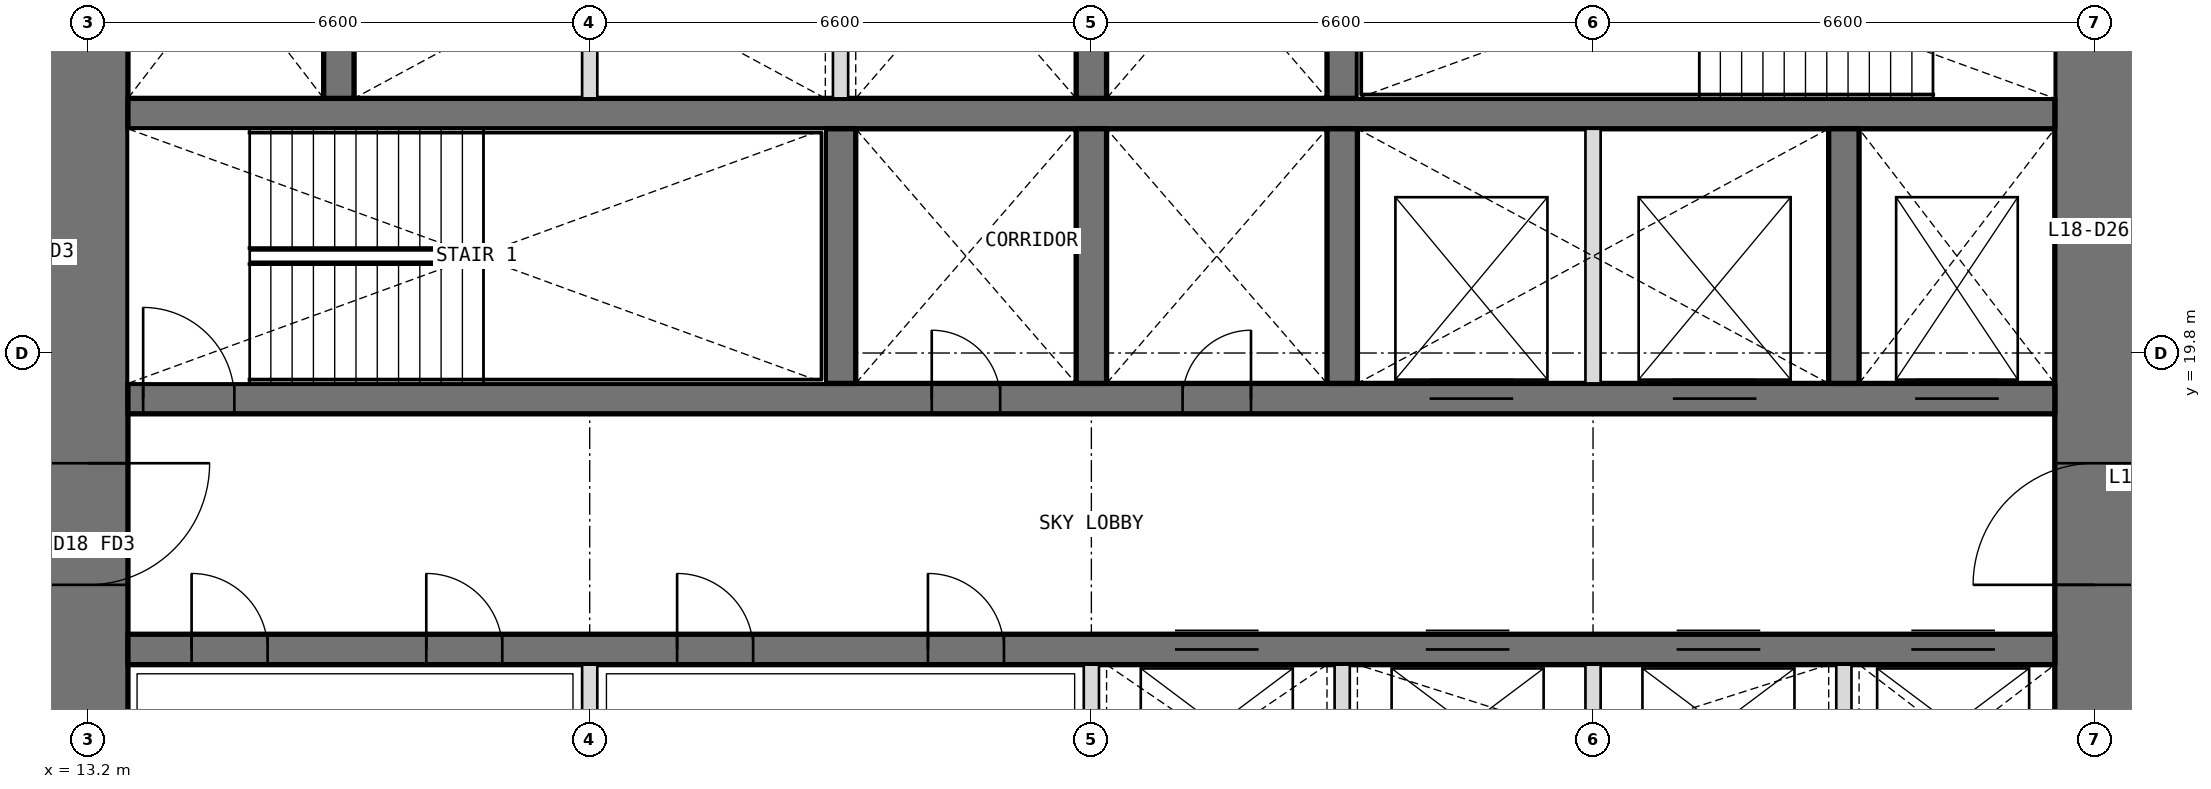
"""IFC4 building model, lengths in metres.
Left out: names, types, materials, properties, quantities, classifications, styles, units other than length and angle.
Written with IfcOpenShell. Run it as: python <this file> out.ifc"""

import sys

from ifc_helpers import new_model, si_unit, direction, frame, frame_2d, origin, place, context, subcontext, project, spatial, rectangle, extrude, element, fill, save


model = new_model("IFC4")
c1 = context("Model", 3, precision=1e-05, world=origin(), true_north=direction((0.0, 1.0)))
c2 = subcontext(c1, "Body", "Model", "MODEL_VIEW")
j1 = project(units=[si_unit("LENGTHUNIT", "METRE"), si_unit("PLANEANGLEUNIT", "RADIAN")], contexts=[c1])
p1 = place(None, origin())
s1 = spatial("IfcSite", under=j1, at=p1, CompositionType="ELEMENT")
p2 = place(p1, origin())
s2 = spatial("IfcBuilding", under=s1, at=p2, CompositionType="ELEMENT")
p3 = place(p2, frame((0.0, 0.0, 82.2)))
s3 = spatial("IfcBuildingStorey", under=s2, at=p3, CompositionType="ELEMENT", Elevation=82.2)
p4 = place(p3, frame((39.6, 13.725, 0.0), z_axis=(0.0, 0.0, 1.0), x_axis=(0.0, 1.0, 0.0)))
e1 = element("IfcWall", 1, at=p4, inside=s3, PredefinedType="SHEAR", context=c2, shape_type="SweptSolid", body=[
    extrude(rectangle(XDim=18.75, YDim=1.05, at=frame_2d((9.375, 0.0))), origin(), (0.0, 0.0, 1.0), 4.2),
])
p5 = place(p4, frame((3.025, 0.0, 0.0)))
e2 = element("IfcOpeningElement", 2, at=p5, cuts=e1, PredefinedType="OPENING", context=c2, shape_type="SweptSolid", body=[
    extrude(rectangle(XDim=1.6, YDim=2.1, at=frame_2d((0.8, 1.05))), frame((0.0, 0.535, 0.0), z_axis=(0.0, -1.0, 0.0), x_axis=(1.0, 0.0, 0.0)), (0.0, 0.0, 1.0), 1.07),
])
p6 = place(p4, frame((13.825, 0.0, 0.0)))
e3 = element("IfcOpeningElement", 3, at=p6, cuts=e1, PredefinedType="OPENING", context=c2, shape_type="SweptSolid", body=[
    extrude(rectangle(XDim=1.6, YDim=2.1, at=frame_2d((0.8, 1.05))), frame((0.0, 0.535, 0.0), z_axis=(0.0, -1.0, 0.0), x_axis=(1.0, 0.0, 0.0)), (0.0, 0.0, 1.0), 1.07),
])
p7 = place(p3, frame((13.2, 32.475, 0.0), z_axis=(0.0, 0.0, 1.0), x_axis=(0.0, -1.0, 0.0)))
e4 = element("IfcWall", 4, at=p7, inside=s3, PredefinedType="SHEAR", context=c2, shape_type="SweptSolid", body=[
    extrude(rectangle(XDim=18.75, YDim=1.05, at=frame_2d((9.375, 0.0))), origin(), (0.0, 0.0, 1.0), 4.2),
])
p8 = place(p7, frame((14.125, 0.0, 0.0)))
e5 = element("IfcOpeningElement", 5, at=p8, cuts=e4, PredefinedType="OPENING", context=c2, shape_type="SweptSolid", body=[
    extrude(rectangle(XDim=1.6, YDim=2.1, at=frame_2d((0.8, 1.05))), frame((0.0, 0.535, 0.0), z_axis=(0.0, -1.0, 0.0), x_axis=(1.0, 0.0, 0.0)), (0.0, 0.0, 1.0), 1.07),
])
p9 = place(p7, frame((3.325, 0.0, 0.0)))
e6 = element("IfcOpeningElement", 6, at=p9, cuts=e4, PredefinedType="OPENING", context=c2, shape_type="SweptSolid", body=[
    extrude(rectangle(XDim=1.6, YDim=2.1, at=frame_2d((0.8, 1.05))), frame((0.0, 0.535, 0.0), z_axis=(0.0, -1.0, 0.0), x_axis=(1.0, 0.0, 0.0)), (0.0, 0.0, 1.0), 1.07),
])
p10 = place(p3, frame((13.725, 15.9, 0.0), z_axis=(0.0, 0.0, 1.0), x_axis=(1.0, 0.0, 0.0)))
e7 = element("IfcWall", 7, at=p10, inside=s3, PredefinedType="SHEAR", context=c2, shape_type="SweptSolid", body=[
    extrude(rectangle(XDim=25.35, YDim=0.4, at=frame_2d((12.675, 0.0))), origin(), (0.0, 0.0, 1.0), 4.2),
])
p11 = place(p10, frame((0.837, 0.0, 0.0)))
e8 = element("IfcOpeningElement", 8, at=p11, cuts=e7, PredefinedType="OPENING", context=c2, shape_type="SweptSolid", body=[
    extrude(rectangle(XDim=1.0, YDim=2.1, at=frame_2d((0.5, 1.05))), frame((0.0, 0.21, 0.0), z_axis=(0.0, -1.0, 0.0), x_axis=(1.0, 0.0, 0.0)), (0.0, 0.0, 1.0), 0.42),
])
p12 = place(p10, frame((3.925, 0.0, 0.0)))
e9 = element("IfcOpeningElement", 9, at=p12, cuts=e7, PredefinedType="OPENING", context=c2, shape_type="SweptSolid", body=[
    extrude(rectangle(XDim=1.0, YDim=2.1, at=frame_2d((0.5, 1.05))), frame((0.0, 0.21, 0.0), z_axis=(0.0, -1.0, 0.0), x_axis=(1.0, 0.0, 0.0)), (0.0, 0.0, 1.0), 0.42),
])
p13 = place(p10, frame((7.225, 0.0, 0.0)))
e10 = element("IfcOpeningElement", 10, at=p13, cuts=e7, PredefinedType="OPENING", context=c2, shape_type="SweptSolid", body=[
    extrude(rectangle(XDim=1.0, YDim=2.1, at=frame_2d((0.5, 1.05))), frame((0.0, 0.21, 0.0), z_axis=(0.0, -1.0, 0.0), x_axis=(1.0, 0.0, 0.0)), (0.0, 0.0, 1.0), 0.42),
])
p14 = place(p10, frame((10.525, 0.0, 0.0)))
e11 = element("IfcOpeningElement", 11, at=p14, cuts=e7, PredefinedType="OPENING", context=c2, shape_type="SweptSolid", body=[
    extrude(rectangle(XDim=1.0, YDim=2.1, at=frame_2d((0.5, 1.05))), frame((0.0, 0.21, 0.0), z_axis=(0.0, -1.0, 0.0), x_axis=(1.0, 0.0, 0.0)), (0.0, 0.0, 1.0), 0.42),
])
p15 = place(p10, frame((13.775, 0.0, 0.0)))
e12 = element("IfcOpeningElement", 12, at=p15, cuts=e7, PredefinedType="OPENING", context=c2, shape_type="SweptSolid", body=[
    extrude(rectangle(XDim=1.1, YDim=2.1, at=frame_2d((0.55, 1.05))), frame((0.0, 0.21, 0.0), z_axis=(0.0, -1.0, 0.0), x_axis=(1.0, 0.0, 0.0)), (0.0, 0.0, 1.0), 0.42),
])
p16 = place(p10, frame((17.075, 0.0, 0.0)))
e13 = element("IfcOpeningElement", 13, at=p16, cuts=e7, PredefinedType="OPENING", context=c2, shape_type="SweptSolid", body=[
    extrude(rectangle(XDim=1.1, YDim=2.1, at=frame_2d((0.55, 1.05))), frame((0.0, 0.21, 0.0), z_axis=(0.0, -1.0, 0.0), x_axis=(1.0, 0.0, 0.0)), (0.0, 0.0, 1.0), 0.42),
])
p17 = place(p10, frame((20.375, 0.0, 0.0)))
e14 = element("IfcOpeningElement", 14, at=p17, cuts=e7, PredefinedType="OPENING", context=c2, shape_type="SweptSolid", body=[
    extrude(rectangle(XDim=1.1, YDim=2.1, at=frame_2d((0.55, 1.05))), frame((0.0, 0.21, 0.0), z_axis=(0.0, -1.0, 0.0), x_axis=(1.0, 0.0, 0.0)), (0.0, 0.0, 1.0), 0.42),
])
p18 = place(p10, frame((23.462, 0.0, 0.0)))
e15 = element("IfcOpeningElement", 15, at=p18, cuts=e7, PredefinedType="OPENING", context=c2, shape_type="SweptSolid", body=[
    extrude(rectangle(XDim=1.1, YDim=2.1, at=frame_2d((0.55, 1.05))), frame((0.0, 0.21, 0.0), z_axis=(0.0, -1.0, 0.0), x_axis=(1.0, 0.0, 0.0)), (0.0, 0.0, 1.0), 0.42),
])
p19 = place(p3, frame((13.725, 19.2, 0.0), z_axis=(0.0, 0.0, 1.0), x_axis=(1.0, 0.0, 0.0)))
e16 = element("IfcWall", 16, at=p19, inside=s3, PredefinedType="SHEAR", context=c2, shape_type="SweptSolid", body=[
    extrude(rectangle(XDim=25.35, YDim=0.4, at=frame_2d((12.675, 0.0))), origin(), (0.0, 0.0, 1.0), 4.2),
])
p20 = place(p19, frame((10.575, 0.0, 0.0)))
e17 = element("IfcOpeningElement", 17, at=p20, cuts=e16, PredefinedType="OPENING", context=c2, shape_type="SweptSolid", body=[
    extrude(rectangle(XDim=0.9, YDim=2.1, at=frame_2d((0.45, 1.05))), frame((0.0, 0.21, 0.0), z_axis=(0.0, -1.0, 0.0), x_axis=(1.0, 0.0, 0.0)), (0.0, 0.0, 1.0), 0.42),
])
p21 = place(p19, frame((13.875, 0.0, 0.0)))
e18 = element("IfcOpeningElement", 18, at=p21, cuts=e16, PredefinedType="OPENING", context=c2, shape_type="SweptSolid", body=[
    extrude(rectangle(XDim=0.9, YDim=2.1, at=frame_2d((0.45, 1.05))), frame((0.0, 0.21, 0.0), z_axis=(0.0, -1.0, 0.0), x_axis=(1.0, 0.0, 0.0)), (0.0, 0.0, 1.0), 0.42),
])
p22 = place(p19, frame((0.2, 0.0, 0.0)))
e19 = element("IfcOpeningElement", 19, at=p22, cuts=e16, PredefinedType="OPENING", context=c2, shape_type="SweptSolid", body=[
    extrude(rectangle(XDim=1.2, YDim=2.1, at=frame_2d((0.6, 1.05))), frame((0.0, 0.21, 0.0), z_axis=(0.0, -1.0, 0.0), x_axis=(1.0, 0.0, 0.0)), (0.0, 0.0, 1.0), 0.42),
])
p23 = place(p19, frame((23.512, 0.0, 0.0)))
e20 = element("IfcOpeningElement", 20, at=p23, cuts=e16, PredefinedType="OPENING", context=c2, shape_type="SweptSolid", body=[
    extrude(rectangle(XDim=1.1, YDim=2.1, at=frame_2d((0.55, 1.05))), frame((0.0, 0.21, 0.0), z_axis=(0.0, -1.0, 0.0), x_axis=(1.0, 0.0, 0.0)), (0.0, 0.0, 1.0), 0.42),
])
p24 = place(p19, frame((17.125, 0.0, 0.0)))
e21 = element("IfcOpeningElement", 21, at=p24, cuts=e16, PredefinedType="OPENING", context=c2, shape_type="SweptSolid", body=[
    extrude(rectangle(XDim=1.1, YDim=2.1, at=frame_2d((0.55, 1.05))), frame((0.0, 0.21, 0.0), z_axis=(0.0, -1.0, 0.0), x_axis=(1.0, 0.0, 0.0)), (0.0, 0.0, 1.0), 0.42),
])
p25 = place(p19, frame((20.325, 0.0, 0.0)))
e22 = element("IfcOpeningElement", 22, at=p25, cuts=e16, PredefinedType="OPENING", context=c2, shape_type="SweptSolid", body=[
    extrude(rectangle(XDim=1.1, YDim=2.1, at=frame_2d((0.55, 1.05))), frame((0.0, 0.21, 0.0), z_axis=(0.0, -1.0, 0.0), x_axis=(1.0, 0.0, 0.0)), (0.0, 0.0, 1.0), 0.42),
])
p26 = place(p3, frame((13.725, 22.95, 0.0), z_axis=(0.0, 0.0, 1.0), x_axis=(1.0, 0.0, 0.0)))
e23 = element("IfcWall", 23, at=p26, inside=s3, PredefinedType="SHEAR", context=c2, shape_type="SweptSolid", body=[
    extrude(rectangle(XDim=25.35, YDim=0.4, at=frame_2d((12.675, 0.0))), origin(), (0.0, 0.0, 1.0), 4.2),
])
for number, where, z_axis, x_axis in (
    (24, (23.1, 19.4, 0.0), (0.0, 0.0, 1.0), (0.0, 1.0, 0.0)),
    (25, (26.4, 19.4, 0.0), (0.0, 0.0, 1.0), (0.0, 1.0, 0.0)),
    (26, (29.7, 19.4, 0.0), (0.0, 0.0, 1.0), (0.0, 1.0, 0.0)),
    (27, (36.3, 19.4, 0.0), (0.0, 0.0, 1.0), (0.0, 1.0, 0.0)),
    (28, (16.5, 23.15, 0.0), (0.0, 0.0, 1.0), (0.0, 1.0, 0.0)),
    (29, (26.4, 23.15, 0.0), (0.0, 0.0, 1.0), (0.0, 1.0, 0.0)),
    (30, (29.7, 23.15, 0.0), (0.0, 0.0, 1.0), (0.0, 1.0, 0.0)),
):
    element("IfcWall", number, at=place(p3, frame(where, z_axis=z_axis, x_axis=x_axis)), inside=s3, PredefinedType="SHEAR", context=c2, shape_type="SweptSolid", body=[
        extrude(rectangle(XDim=3.35, YDim=0.4, at=frame_2d((1.675, 0.0))), origin(), (0.0, 0.0, 1.0), 4.2),
    ])
for number, where, z_axis, x_axis in (
    (31, (19.8, 13.725, 0.0), (0.0, 0.0, 1.0), (0.0, 1.0, 0.0)),
    (32, (26.4, 13.725, 0.0), (0.0, 0.0, 1.0), (0.0, 1.0, 0.0)),
    (33, (29.7, 13.725, 0.0), (0.0, 0.0, 1.0), (0.0, 1.0, 0.0)),
    (34, (33.0, 13.725, 0.0), (0.0, 0.0, 1.0), (0.0, 1.0, 0.0)),
    (35, (36.3, 13.725, 0.0), (0.0, 0.0, 1.0), (0.0, 1.0, 0.0)),
):
    element("IfcWall", number, at=place(p3, frame(where, z_axis=z_axis, x_axis=x_axis)), inside=s3, PredefinedType="PARTITIONING", context=c2, shape_type="SweptSolid", body=[
        extrude(rectangle(XDim=1.975, YDim=0.2, at=frame_2d((0.987, 0.0))), origin(), (0.0, 0.0, 1.0), 4.2),
    ])
for number, where, z_axis, x_axis in (
    (36, (33.0, 19.4, 0.0), (0.0, 0.0, 1.0), (0.0, 1.0, 0.0)),
    (37, (19.8, 23.15, 0.0), (0.0, 0.0, 1.0), (0.0, 1.0, 0.0)),
    (38, (23.1, 23.15, 0.0), (0.0, 0.0, 1.0), (0.0, 1.0, 0.0)),
):
    element("IfcWall", number, at=place(p3, frame(where, z_axis=z_axis, x_axis=x_axis)), inside=s3, PredefinedType="PARTITIONING", context=c2, shape_type="SweptSolid", body=[
        extrude(rectangle(XDim=3.35, YDim=0.2, at=frame_2d((1.675, 0.0))), origin(), (0.0, 0.0, 1.0), 4.2),
    ])
p27 = place(p20, origin())
e39 = element("IfcDoor", 39, at=p27, inside=s3, OperationType="SINGLE_SWING_LEFT", PredefinedType="DOOR", context=c2, shape_type="SweptSolid", body=[
    extrude(rectangle(XDim=0.9, YDim=2.1, at=frame_2d((0.45, 1.05))), frame((0.0, 0.025, 0.0), z_axis=(0.0, -1.0, 0.0), x_axis=(1.0, 0.0, 0.0)), (0.0, 0.0, 1.0), 0.05),
])
fill(e17, e39)
p28 = place(p21, origin())
e40 = element("IfcDoor", 40, at=p28, inside=s3, OperationType="SINGLE_SWING_RIGHT", PredefinedType="DOOR", context=c2, shape_type="SweptSolid", body=[
    extrude(rectangle(XDim=0.9, YDim=2.1, at=frame_2d((0.45, 1.05))), frame((0.0, 0.025, 0.0), z_axis=(0.0, -1.0, 0.0), x_axis=(1.0, 0.0, 0.0)), (0.0, 0.0, 1.0), 0.05),
])
fill(e18, e40)
p29 = place(p11, origin())
e41 = element("IfcDoor", 41, at=p29, inside=s3, OperationType="SINGLE_SWING_LEFT", PredefinedType="DOOR", context=c2, shape_type="SweptSolid", body=[
    extrude(rectangle(XDim=1.0, YDim=2.1, at=frame_2d((0.5, 1.05))), frame((0.0, 0.025, 0.0), z_axis=(0.0, -1.0, 0.0), x_axis=(1.0, 0.0, 0.0)), (0.0, 0.0, 1.0), 0.05),
])
fill(e8, e41)
p30 = place(p12, origin())
e42 = element("IfcDoor", 42, at=p30, inside=s3, OperationType="SINGLE_SWING_LEFT", PredefinedType="DOOR", context=c2, shape_type="SweptSolid", body=[
    extrude(rectangle(XDim=1.0, YDim=2.1, at=frame_2d((0.5, 1.05))), frame((0.0, 0.025, 0.0), z_axis=(0.0, -1.0, 0.0), x_axis=(1.0, 0.0, 0.0)), (0.0, 0.0, 1.0), 0.05),
])
fill(e9, e42)
p31 = place(p13, origin())
e43 = element("IfcDoor", 43, at=p31, inside=s3, OperationType="SINGLE_SWING_LEFT", PredefinedType="DOOR", context=c2, shape_type="SweptSolid", body=[
    extrude(rectangle(XDim=1.0, YDim=2.1, at=frame_2d((0.5, 1.05))), frame((0.0, 0.025, 0.0), z_axis=(0.0, -1.0, 0.0), x_axis=(1.0, 0.0, 0.0)), (0.0, 0.0, 1.0), 0.05),
])
fill(e10, e43)
p32 = place(p14, origin())
e44 = element("IfcDoor", 44, at=p32, inside=s3, OperationType="SINGLE_SWING_LEFT", PredefinedType="DOOR", context=c2, shape_type="SweptSolid", body=[
    extrude(rectangle(XDim=1.0, YDim=2.1, at=frame_2d((0.5, 1.05))), frame((0.0, 0.025, 0.0), z_axis=(0.0, -1.0, 0.0), x_axis=(1.0, 0.0, 0.0)), (0.0, 0.0, 1.0), 0.05),
])
fill(e11, e44)
p33 = place(p22, origin())
e45 = element("IfcDoor", 45, at=p33, inside=s3, OperationType="SINGLE_SWING_LEFT", PredefinedType="DOOR", context=c2, shape_type="SweptSolid", body=[
    extrude(rectangle(XDim=1.2, YDim=2.1, at=frame_2d((0.6, 1.05))), frame((0.0, 0.025, 0.0), z_axis=(0.0, -1.0, 0.0), x_axis=(1.0, 0.0, 0.0)), (0.0, 0.0, 1.0), 0.05),
])
fill(e19, e45)
p34 = place(p8, origin())
e46 = element("IfcDoor", 46, at=p34, inside=s3, OperationType="DOUBLE_DOOR_DOUBLE_SWING", PredefinedType="DOOR", context=c2, shape_type="SweptSolid", body=[
    extrude(rectangle(XDim=1.6, YDim=2.1, at=frame_2d((0.8, 1.05))), frame((0.0, 0.025, 0.0), z_axis=(0.0, -1.0, 0.0), x_axis=(1.0, 0.0, 0.0)), (0.0, 0.0, 1.0), 0.05),
])
fill(e5, e46)
p35 = place(p5, origin())
e47 = element("IfcDoor", 47, at=p35, inside=s3, OperationType="DOUBLE_DOOR_DOUBLE_SWING", PredefinedType="DOOR", context=c2, shape_type="SweptSolid", body=[
    extrude(rectangle(XDim=1.6, YDim=2.1, at=frame_2d((0.8, 1.05))), frame((0.0, 0.025, 0.0), z_axis=(0.0, -1.0, 0.0), x_axis=(1.0, 0.0, 0.0)), (0.0, 0.0, 1.0), 0.05),
])
fill(e2, e47)
p36 = place(p15, origin())
e48 = element("IfcDoor", 48, at=p36, inside=s3, OperationType="DOUBLE_DOOR_SLIDING", PredefinedType="DOOR", context=c2, shape_type="SweptSolid", body=[
    extrude(rectangle(XDim=1.1, YDim=2.1, at=frame_2d((0.55, 1.05))), frame((0.0, 0.025, 0.0), z_axis=(0.0, -1.0, 0.0), x_axis=(1.0, 0.0, 0.0)), (0.0, 0.0, 1.0), 0.05),
])
fill(e12, e48)
p37 = place(p16, origin())
e49 = element("IfcDoor", 49, at=p37, inside=s3, OperationType="DOUBLE_DOOR_SLIDING", PredefinedType="DOOR", context=c2, shape_type="SweptSolid", body=[
    extrude(rectangle(XDim=1.1, YDim=2.1, at=frame_2d((0.55, 1.05))), frame((0.0, 0.025, 0.0), z_axis=(0.0, -1.0, 0.0), x_axis=(1.0, 0.0, 0.0)), (0.0, 0.0, 1.0), 0.05),
])
fill(e13, e49)
p38 = place(p17, origin())
e50 = element("IfcDoor", 50, at=p38, inside=s3, OperationType="DOUBLE_DOOR_SLIDING", PredefinedType="DOOR", context=c2, shape_type="SweptSolid", body=[
    extrude(rectangle(XDim=1.1, YDim=2.1, at=frame_2d((0.55, 1.05))), frame((0.0, 0.025, 0.0), z_axis=(0.0, -1.0, 0.0), x_axis=(1.0, 0.0, 0.0)), (0.0, 0.0, 1.0), 0.05),
])
fill(e14, e50)
p39 = place(p18, origin())
e51 = element("IfcDoor", 51, at=p39, inside=s3, OperationType="DOUBLE_DOOR_SLIDING", PredefinedType="DOOR", context=c2, shape_type="SweptSolid", body=[
    extrude(rectangle(XDim=1.1, YDim=2.1, at=frame_2d((0.55, 1.05))), frame((0.0, 0.025, 0.0), z_axis=(0.0, -1.0, 0.0), x_axis=(1.0, 0.0, 0.0)), (0.0, 0.0, 1.0), 0.05),
])
fill(e15, e51)
p40 = place(p23, origin())
e52 = element("IfcDoor", 52, at=p40, inside=s3, OperationType="DOUBLE_DOOR_SLIDING", PredefinedType="DOOR", context=c2, shape_type="SweptSolid", body=[
    extrude(rectangle(XDim=1.1, YDim=2.1, at=frame_2d((0.55, 1.05))), frame((0.0, 0.025, 0.0), z_axis=(0.0, -1.0, 0.0), x_axis=(1.0, 0.0, 0.0)), (0.0, 0.0, 1.0), 0.05),
])
fill(e20, e52)
p41 = place(p24, origin())
e53 = element("IfcDoor", 53, at=p41, inside=s3, OperationType="DOUBLE_DOOR_SLIDING", PredefinedType="DOOR", context=c2, shape_type="SweptSolid", body=[
    extrude(rectangle(XDim=1.1, YDim=2.1, at=frame_2d((0.55, 1.05))), frame((0.0, 0.025, 0.0), z_axis=(0.0, -1.0, 0.0), x_axis=(1.0, 0.0, 0.0)), (0.0, 0.0, 1.0), 0.05),
])
fill(e21, e53)
p42 = place(p25, origin())
e54 = element("IfcDoor", 54, at=p42, inside=s3, OperationType="DOUBLE_DOOR_SLIDING", PredefinedType="DOOR", context=c2, shape_type="SweptSolid", body=[
    extrude(rectangle(XDim=1.1, YDim=2.1, at=frame_2d((0.55, 1.05))), frame((0.0, 0.025, 0.0), z_axis=(0.0, -1.0, 0.0), x_axis=(1.0, 0.0, 0.0)), (0.0, 0.0, 1.0), 0.05),
])
fill(e22, e54)
save(model, sys.argv[1])
